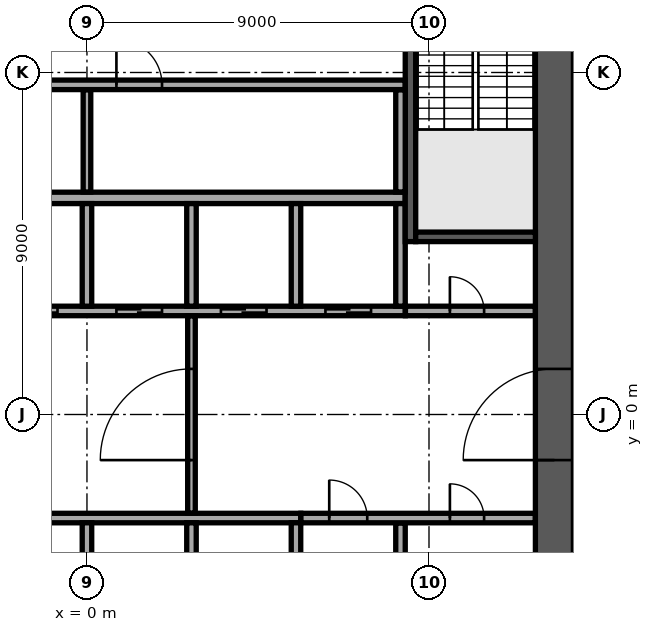
"""IFC4 building model, lengths in metres.
Left out: names, types, materials, properties, quantities, classifications, styles, units other than length and angle.
Written with IfcOpenShell. Run it as: python <this file> out.ifc"""

import sys

from ifc_helpers import new_model, si_unit, direction, frame, frame_2d, origin, place, context, subcontext, project, spatial, rectangle, extrude, element, fill, save


model = new_model("IFC4")
c1 = context("Model", 3, precision=1e-05, world=origin(), true_north=direction((0.0, 1.0)))
c2 = subcontext(c1, "Body", "Model", "MODEL_VIEW")
j1 = project(units=[si_unit("LENGTHUNIT", "METRE"), si_unit("PLANEANGLEUNIT", "RADIAN")], contexts=[c1])
p1 = place(None, origin())
s1 = spatial("IfcSite", under=j1, at=p1, CompositionType="ELEMENT")
p2 = place(p1, origin())
s2 = spatial("IfcBuilding", under=s1, at=p2, CompositionType="ELEMENT")
p3 = place(p2, frame((0.0, 0.0, 135.7)))
s3 = spatial("IfcBuildingStorey", under=s2, at=p3, CompositionType="ELEMENT", Elevation=135.7)
p4 = place(p3, frame((12.3, -11.8, 0.0), z_axis=(0.0, 0.0, 1.0), x_axis=(0.0, 1.0, 0.0)))
e1 = element("IfcWall", 1, at=p4, inside=s3, PredefinedType="SHEAR", context=c2, shape_type="SweptSolid", body=[
    extrude(rectangle(XDim=23.6, YDim=1.0, at=frame_2d((11.8, 0.0))), origin(), (0.0, 0.0, 1.0), 3.6),
])
p5 = place(p4, frame((10.6, 0.0, 0.0)))
e2 = element("IfcOpeningElement", 2, at=p5, cuts=e1, PredefinedType="OPENING", context=c2, shape_type="SweptSolid", body=[
    extrude(rectangle(XDim=2.4, YDim=2.4, at=frame_2d((1.2, 1.2))), frame((0.0, 0.51, 0.0), z_axis=(0.0, -1.0, 0.0), x_axis=(1.0, 0.0, 0.0)), (0.0, 0.0, 1.0), 1.02),
])
p6 = place(p3, frame((-8.375, 5.7, 0.0), z_axis=(0.0, 0.0, 1.0), x_axis=(1.0, 0.0, 0.0)))
e3 = element("IfcWall", 3, at=p6, inside=s3, PredefinedType="SOLIDWALL", context=c2, shape_type="SweptSolid", body=[
    extrude(rectangle(XDim=16.75, YDim=0.3, at=frame_2d((8.375, 0.0))), origin(), (0.0, 0.0, 1.0), 3.6),
])
p7 = place(p3, frame((-8.375, 2.725, 0.0), z_axis=(0.0, 0.0, 1.0), x_axis=(1.0, 0.0, 0.0)))
e4 = element("IfcWall", 4, at=p7, inside=s3, PredefinedType="SOLIDWALL", context=c2, shape_type="SweptSolid", body=[
    extrude(rectangle(XDim=16.75, YDim=0.25, at=frame_2d((8.375, 0.0))), origin(), (0.0, 0.0, 1.0), 3.6),
])
p8 = place(p7, frame((0.9, 0.0, 0.0)))
e5 = element("IfcOpeningElement", 5, at=p8, cuts=e4, PredefinedType="OPENING", context=c2, shape_type="SweptSolid", body=[
    extrude(rectangle(XDim=1.2, YDim=2.1, at=frame_2d((0.6, 1.05))), frame((0.0, 0.135, 0.0), z_axis=(0.0, -1.0, 0.0), x_axis=(1.0, 0.0, 0.0)), (0.0, 0.0, 1.0), 0.27),
])
p9 = place(p7, frame((3.65, 0.0, 0.0)))
e6 = element("IfcOpeningElement", 6, at=p9, cuts=e4, PredefinedType="OPENING", context=c2, shape_type="SweptSolid", body=[
    extrude(rectangle(XDim=1.2, YDim=2.1, at=frame_2d((0.6, 1.05))), frame((0.0, 0.135, 0.0), z_axis=(0.0, -1.0, 0.0), x_axis=(1.0, 0.0, 0.0)), (0.0, 0.0, 1.0), 0.27),
])
p10 = place(p7, frame((6.4, 0.0, 0.0)))
e7 = element("IfcOpeningElement", 7, at=p10, cuts=e4, PredefinedType="OPENING", context=c2, shape_type="SweptSolid", body=[
    extrude(rectangle(XDim=1.2, YDim=2.1, at=frame_2d((0.6, 1.05))), frame((0.0, 0.135, 0.0), z_axis=(0.0, -1.0, 0.0), x_axis=(1.0, 0.0, 0.0)), (0.0, 0.0, 1.0), 0.27),
])
p11 = place(p7, frame((9.15, 0.0, 0.0)))
e8 = element("IfcOpeningElement", 8, at=p11, cuts=e4, PredefinedType="OPENING", context=c2, shape_type="SweptSolid", body=[
    extrude(rectangle(XDim=1.2, YDim=2.1, at=frame_2d((0.6, 1.05))), frame((0.0, 0.135, 0.0), z_axis=(0.0, -1.0, 0.0), x_axis=(1.0, 0.0, 0.0)), (0.0, 0.0, 1.0), 0.27),
])
p12 = place(p7, frame((11.9, 0.0, 0.0)))
e9 = element("IfcOpeningElement", 9, at=p12, cuts=e4, PredefinedType="OPENING", context=c2, shape_type="SweptSolid", body=[
    extrude(rectangle(XDim=1.2, YDim=2.1, at=frame_2d((0.6, 1.05))), frame((0.0, 0.135, 0.0), z_axis=(0.0, -1.0, 0.0), x_axis=(1.0, 0.0, 0.0)), (0.0, 0.0, 1.0), 0.27),
])
p13 = place(p7, frame((14.65, 0.0, 0.0)))
e10 = element("IfcOpeningElement", 10, at=p13, cuts=e4, PredefinedType="OPENING", context=c2, shape_type="SweptSolid", body=[
    extrude(rectangle(XDim=1.2, YDim=2.1, at=frame_2d((0.6, 1.05))), frame((0.0, 0.135, 0.0), z_axis=(0.0, -1.0, 0.0), x_axis=(1.0, 0.0, 0.0)), (0.0, 0.0, 1.0), 0.27),
])
for number, where, z_axis, x_axis in (
    (11, (0.0, 2.85, 0.0), (0.0, 0.0, 1.0), (0.0, 1.0, 0.0)),
    (12, (2.75, 2.85, 0.0), (0.0, 0.0, 1.0), (0.0, 1.0, 0.0)),
    (13, (5.5, 2.85, 0.0), (0.0, 0.0, 1.0), (0.0, 1.0, 0.0)),
    (14, (8.25, 2.85, 0.0), (0.0, 0.0, 1.0), (0.0, 1.0, 0.0)),
):
    element("IfcWall", number, at=place(p3, frame(where, z_axis=z_axis, x_axis=x_axis)), inside=s3, PredefinedType="SOLIDWALL", context=c2, shape_type="SweptSolid", body=[
        extrude(rectangle(XDim=2.7, YDim=0.25, at=frame_2d((1.35, 0.0))), origin(), (0.0, 0.0, 1.0), 3.6),
    ])
p14 = place(p3, frame((-2.875, -2.725, 0.0), z_axis=(0.0, 0.0, 1.0), x_axis=(1.0, 0.0, 0.0)))
e15 = element("IfcWall", 15, at=p14, inside=s3, PredefinedType="SOLIDWALL", context=c2, shape_type="SweptSolid", body=[
    extrude(rectangle(XDim=8.5, YDim=0.25, at=frame_2d((4.25, 0.0))), origin(), (0.0, 0.0, 1.0), 3.6),
])
for number, where, z_axis, x_axis in (
    (16, (0.0, -5.55, 0.0), (0.0, 0.0, 1.0), (0.0, 1.0, 0.0)),
    (17, (2.75, -5.55, 0.0), (0.0, 0.0, 1.0), (0.0, 1.0, 0.0)),
    (18, (5.5, -5.55, 0.0), (0.0, 0.0, 1.0), (0.0, 1.0, 0.0)),
):
    element("IfcWall", number, at=place(p3, frame(where, z_axis=z_axis, x_axis=x_axis)), inside=s3, PredefinedType="SOLIDWALL", context=c2, shape_type="SweptSolid", body=[
        extrude(rectangle(XDim=2.7, YDim=0.25, at=frame_2d((1.35, 0.0))), origin(), (0.0, 0.0, 1.0), 3.6),
    ])
p15 = place(p3, frame((8.512, 4.55, 0.0), z_axis=(0.0, 0.0, 1.0), x_axis=(0.0, 1.0, 0.0)))
e19 = element("IfcWall", 19, at=p15, inside=s3, PredefinedType="SOLIDWALL", context=c2, shape_type="SweptSolid", body=[
    extrude(rectangle(XDim=7.25, YDim=0.275, at=frame_2d((3.625, 0.0))), origin(), (0.0, 0.0, 1.0), 3.6),
])
p16 = place(p15, frame((6.0, 0.0, 0.0)))
e20 = element("IfcOpeningElement", 20, at=p16, cuts=e19, PredefinedType="OPENING", context=c2, shape_type="SweptSolid", body=[
    extrude(rectangle(XDim=1.0, YDim=2.1, at=frame_2d((0.5, 1.05))), frame((0.0, 0.147, 0.0), z_axis=(0.0, -1.0, 0.0), x_axis=(1.0, 0.0, 0.0)), (0.0, 0.0, 1.0), 0.295),
])
p17 = place(p3, frame((8.65, 4.675, 0.0), z_axis=(0.0, 0.0, 1.0), x_axis=(1.0, 0.0, 0.0)))
e21 = element("IfcWall", 21, at=p17, inside=s3, PredefinedType="SOLIDWALL", context=c2, shape_type="SweptSolid", body=[
    extrude(rectangle(XDim=3.15, YDim=0.25, at=frame_2d((1.575, 0.0))), origin(), (0.0, 0.0, 1.0), 3.6),
])
p18 = place(p3, frame((8.25, -5.545, 0.0), z_axis=(0.0, 0.0, 1.0), x_axis=(0.0, 1.0, 0.0)))
e22 = element("IfcWall", 22, at=p18, inside=s3, PredefinedType="PARTITIONING", context=c2, shape_type="SweptSolid", body=[
    extrude(rectangle(XDim=2.69, YDim=0.25, at=frame_2d((1.345, 0.0))), origin(), (0.0, 0.0, 1.0), 3.6),
])
p19 = place(p3, frame((5.63, -2.725, 0.0), z_axis=(0.0, 0.0, 1.0), x_axis=(1.0, 0.0, 0.0)))
e23 = element("IfcWall", 23, at=p19, inside=s3, PredefinedType="PARTITIONING", context=c2, shape_type="SweptSolid", body=[
    extrude(rectangle(XDim=6.165, YDim=0.25, at=frame_2d((3.083, 0.0))), origin(), (0.0, 0.0, 1.0), 3.6),
])
p20 = place(p19, frame((0.745, 0.0, 0.0)))
e24 = element("IfcOpeningElement", 24, at=p20, cuts=e23, PredefinedType="OPENING", context=c2, shape_type="SweptSolid", body=[
    extrude(rectangle(XDim=1.0, YDim=2.1, at=frame_2d((0.5, 1.05))), frame((0.0, 0.135, 0.0), z_axis=(0.0, -1.0, 0.0), x_axis=(1.0, 0.0, 0.0)), (0.0, 0.0, 1.0), 0.27),
])
p21 = place(p19, frame((3.92, 0.0, 0.0)))
e25 = element("IfcOpeningElement", 25, at=p21, cuts=e23, PredefinedType="OPENING", context=c2, shape_type="SweptSolid", body=[
    extrude(rectangle(XDim=0.9, YDim=2.1, at=frame_2d((0.45, 1.05))), frame((0.0, 0.135, 0.0), z_axis=(0.0, -1.0, 0.0), x_axis=(1.0, 0.0, 0.0)), (0.0, 0.0, 1.0), 0.27),
])
p22 = place(p3, frame((2.75, -2.595, 0.0), z_axis=(0.0, 0.0, 1.0), x_axis=(0.0, 1.0, 0.0)))
e26 = element("IfcWall", 26, at=p22, inside=s3, PredefinedType="PARTITIONING", context=c2, shape_type="SweptSolid", body=[
    extrude(rectangle(XDim=5.19, YDim=0.2, at=frame_2d((2.595, 0.0))), origin(), (0.0, 0.0, 1.0), 3.6),
])
p23 = place(p22, frame((1.395, 0.0, 0.0)))
e27 = element("IfcOpeningElement", 27, at=p23, cuts=e26, PredefinedType="OPENING", context=c2, shape_type="SweptSolid", body=[
    extrude(rectangle(XDim=2.4, YDim=2.4, at=frame_2d((1.2, 1.2))), frame((0.0, 0.11, 0.0), z_axis=(0.0, -1.0, 0.0), x_axis=(1.0, 0.0, 0.0)), (0.0, 0.0, 1.0), 0.22),
])
p24 = place(p3, frame((8.38, 2.725, 0.0), z_axis=(0.0, 0.0, 1.0), x_axis=(1.0, 0.0, 0.0)))
e28 = element("IfcWall", 28, at=p24, inside=s3, PredefinedType="PARTITIONING", context=c2, shape_type="SweptSolid", body=[
    extrude(rectangle(XDim=3.415, YDim=0.25, at=frame_2d((1.708, 0.0))), origin(), (0.0, 0.0, 1.0), 3.6),
])
p25 = place(p24, frame((1.17, 0.0, 0.0)))
e29 = element("IfcOpeningElement", 29, at=p25, cuts=e28, PredefinedType="OPENING", context=c2, shape_type="SweptSolid", body=[
    extrude(rectangle(XDim=0.9, YDim=2.1, at=frame_2d((0.45, 1.05))), frame((0.0, 0.135, 0.0), z_axis=(0.0, -1.0, 0.0), x_axis=(1.0, 0.0, 0.0)), (0.0, 0.0, 1.0), 0.27),
])
p26 = place(p3, frame((0.0, 5.855, 0.0), z_axis=(0.0, 0.0, 1.0), x_axis=(0.0, 1.0, 0.0)))
e30 = element("IfcWall", 30, at=p26, inside=s3, PredefinedType="PARTITIONING", context=c2, shape_type="SweptSolid", body=[
    extrude(rectangle(XDim=2.69, YDim=0.2, at=frame_2d((1.345, 0.0))), origin(), (0.0, 0.0, 1.0), 3.6),
])
p27 = place(p3, frame((8.25, 5.855, 0.0), z_axis=(0.0, 0.0, 1.0), x_axis=(0.0, 1.0, 0.0)))
e31 = element("IfcWall", 31, at=p27, inside=s3, PredefinedType="PARTITIONING", context=c2, shape_type="SweptSolid", body=[
    extrude(rectangle(XDim=2.69, YDim=0.25, at=frame_2d((1.345, 0.0))), origin(), (0.0, 0.0, 1.0), 3.6),
])
p28 = place(p3, frame((-8.35, 8.675, 0.0), z_axis=(0.0, 0.0, 1.0), x_axis=(1.0, 0.0, 0.0)))
e32 = element("IfcWall", 32, at=p28, inside=s3, PredefinedType="PARTITIONING", context=c2, shape_type="SweptSolid", body=[
    extrude(rectangle(XDim=16.72, YDim=0.25, at=frame_2d((8.36, 0.0))), origin(), (0.0, 0.0, 1.0), 3.6),
])
p29 = place(p28, frame((0.975, 0.0, 0.0)))
e33 = element("IfcOpeningElement", 33, at=p29, cuts=e32, PredefinedType="OPENING", context=c2, shape_type="SweptSolid", body=[
    extrude(rectangle(XDim=1.0, YDim=2.1, at=frame_2d((0.5, 1.05))), frame((0.0, 0.135, 0.0), z_axis=(0.0, -1.0, 0.0), x_axis=(1.0, 0.0, 0.0)), (0.0, 0.0, 1.0), 0.27),
])
p30 = place(p28, frame((3.725, 0.0, 0.0)))
e34 = element("IfcOpeningElement", 34, at=p30, cuts=e32, PredefinedType="OPENING", context=c2, shape_type="SweptSolid", body=[
    extrude(rectangle(XDim=1.0, YDim=2.1, at=frame_2d((0.5, 1.05))), frame((0.0, 0.135, 0.0), z_axis=(0.0, -1.0, 0.0), x_axis=(1.0, 0.0, 0.0)), (0.0, 0.0, 1.0), 0.27),
])
p31 = place(p28, frame((9.125, 0.0, 0.0)))
e35 = element("IfcOpeningElement", 35, at=p31, cuts=e32, PredefinedType="OPENING", context=c2, shape_type="SweptSolid", body=[
    extrude(rectangle(XDim=1.2, YDim=2.1, at=frame_2d((0.6, 1.05))), frame((0.0, 0.135, 0.0), z_axis=(0.0, -1.0, 0.0), x_axis=(1.0, 0.0, 0.0)), (0.0, 0.0, 1.0), 0.27),
])
p32 = place(p3, frame((-23.187, 9.123, 0.0), z_axis=(0.0, 0.0, 1.0), x_axis=(0.874618419846, 0.484811942578, 0.0)))
e36 = element("IfcWall", 36, at=p32, inside=s3, PredefinedType="PARTITIONING", context=c2, shape_type="SweptSolid", body=[
    extrude(rectangle(XDim=31.713, YDim=0.15, at=frame_2d((15.857, 0.0))), origin(), (0.0, 0.0, 1.0), 3.15),
])
p33 = place(p32, frame((11.252, 0.0, 0.0)))
e37 = element("IfcOpeningElement", 37, at=p33, cuts=e36, PredefinedType="OPENING", context=c2, shape_type="SweptSolid", body=[
    extrude(rectangle(XDim=1.0, YDim=2.1, at=frame_2d((0.5, 1.05))), frame((0.0, 0.085, 0.0), z_axis=(0.0, -1.0, 0.0), x_axis=(1.0, 0.0, 0.0)), (0.0, 0.0, 1.0), 0.17),
])
p34 = place(p32, frame((19.896, 0.0, 0.0)))
e38 = element("IfcOpeningElement", 38, at=p34, cuts=e36, PredefinedType="OPENING", context=c2, shape_type="SweptSolid", body=[
    extrude(rectangle(XDim=1.0, YDim=2.1, at=frame_2d((0.5, 1.05))), frame((0.0, 0.085, 0.0), z_axis=(0.0, -1.0, 0.0), x_axis=(1.0, 0.0, 0.0)), (0.0, 0.0, 1.0), 0.17),
])
p35 = place(p32, frame((29.223, 0.0, 0.0)))
e39 = element("IfcOpeningElement", 39, at=p35, cuts=e36, PredefinedType="OPENING", context=c2, shape_type="SweptSolid", body=[
    extrude(rectangle(XDim=1.0, YDim=2.1, at=frame_2d((0.5, 1.05))), frame((0.0, 0.085, 0.0), z_axis=(0.0, -1.0, 0.0), x_axis=(1.0, 0.0, 0.0)), (0.0, 0.0, 1.0), 0.17),
])
p36 = place(p5, origin())
e40 = element("IfcDoor", 40, at=p36, inside=s3, OperationType="SINGLE_SWING_LEFT", PredefinedType="DOOR", context=c2, shape_type="SweptSolid", body=[
    extrude(rectangle(XDim=2.4, YDim=2.4, at=frame_2d((1.2, 1.2))), frame((0.0, 0.025, 0.0), z_axis=(0.0, -1.0, 0.0), x_axis=(1.0, 0.0, 0.0)), (0.0, 0.0, 1.0), 0.05),
])
fill(e2, e40)
p37 = place(p10, origin())
e41 = element("IfcDoor", 41, at=p37, inside=s3, OperationType="DOUBLE_DOOR_SLIDING", PredefinedType="DOOR", context=c2, shape_type="SweptSolid", body=[
    extrude(rectangle(XDim=1.2, YDim=2.1, at=frame_2d((0.6, 1.05))), frame((0.0, 0.025, 0.0), z_axis=(0.0, -1.0, 0.0), x_axis=(1.0, 0.0, 0.0)), (0.0, 0.0, 1.0), 0.05),
])
fill(e7, e41)
p38 = place(p11, origin())
e42 = element("IfcDoor", 42, at=p38, inside=s3, OperationType="DOUBLE_DOOR_SLIDING", PredefinedType="DOOR", context=c2, shape_type="SweptSolid", body=[
    extrude(rectangle(XDim=1.2, YDim=2.1, at=frame_2d((0.6, 1.05))), frame((0.0, 0.025, 0.0), z_axis=(0.0, -1.0, 0.0), x_axis=(1.0, 0.0, 0.0)), (0.0, 0.0, 1.0), 0.05),
])
fill(e8, e42)
p39 = place(p12, origin())
e43 = element("IfcDoor", 43, at=p39, inside=s3, OperationType="DOUBLE_DOOR_SLIDING", PredefinedType="DOOR", context=c2, shape_type="SweptSolid", body=[
    extrude(rectangle(XDim=1.2, YDim=2.1, at=frame_2d((0.6, 1.05))), frame((0.0, 0.025, 0.0), z_axis=(0.0, -1.0, 0.0), x_axis=(1.0, 0.0, 0.0)), (0.0, 0.0, 1.0), 0.05),
])
fill(e9, e43)
p40 = place(p13, origin())
e44 = element("IfcDoor", 44, at=p40, inside=s3, OperationType="DOUBLE_DOOR_SLIDING", PredefinedType="DOOR", context=c2, shape_type="SweptSolid", body=[
    extrude(rectangle(XDim=1.2, YDim=2.1, at=frame_2d((0.6, 1.05))), frame((0.0, 0.025, 0.0), z_axis=(0.0, -1.0, 0.0), x_axis=(1.0, 0.0, 0.0)), (0.0, 0.0, 1.0), 0.05),
])
fill(e10, e44)
p41 = place(p20, origin())
e45 = element("IfcDoor", 45, at=p41, inside=s3, OperationType="SINGLE_SWING_RIGHT", PredefinedType="DOOR", context=c2, shape_type="SweptSolid", body=[
    extrude(rectangle(XDim=1.0, YDim=2.1, at=frame_2d((0.5, 1.05))), frame((0.0, 0.025, 0.0), z_axis=(0.0, -1.0, 0.0), x_axis=(1.0, 0.0, 0.0)), (0.0, 0.0, 1.0), 0.05),
])
fill(e24, e45)
p42 = place(p25, origin())
e46 = element("IfcDoor", 46, at=p42, inside=s3, OperationType="SINGLE_SWING_RIGHT", PredefinedType="DOOR", context=c2, shape_type="SweptSolid", body=[
    extrude(rectangle(XDim=0.9, YDim=2.1, at=frame_2d((0.45, 1.05))), frame((0.0, 0.025, 0.0), z_axis=(0.0, -1.0, 0.0), x_axis=(1.0, 0.0, 0.0)), (0.0, 0.0, 1.0), 0.05),
])
fill(e29, e46)
p43 = place(p21, origin())
e47 = element("IfcDoor", 47, at=p43, inside=s3, OperationType="SINGLE_SWING_RIGHT", PredefinedType="DOOR", context=c2, shape_type="SweptSolid", body=[
    extrude(rectangle(XDim=0.9, YDim=2.1, at=frame_2d((0.45, 1.05))), frame((0.0, 0.025, 0.0), z_axis=(0.0, -1.0, 0.0), x_axis=(1.0, 0.0, 0.0)), (0.0, 0.0, 1.0), 0.05),
])
fill(e25, e47)
p44 = place(p31, origin())
e48 = element("IfcDoor", 48, at=p44, inside=s3, OperationType="SINGLE_SWING_LEFT", PredefinedType="DOOR", context=c2, shape_type="SweptSolid", body=[
    extrude(rectangle(XDim=1.2, YDim=2.1, at=frame_2d((0.6, 1.05))), frame((0.0, 0.025, 0.0), z_axis=(0.0, -1.0, 0.0), x_axis=(1.0, 0.0, 0.0)), (0.0, 0.0, 1.0), 0.05),
])
fill(e35, e48)
p45 = place(p23, origin())
e49 = element("IfcDoor", 49, at=p45, inside=s3, OperationType="DOUBLE_DOOR_DOUBLE_SWING", PredefinedType="DOOR", context=c2, shape_type="SweptSolid", body=[
    extrude(rectangle(XDim=2.4, YDim=2.4, at=frame_2d((1.2, 1.2))), frame((0.0, 0.025, 0.0), z_axis=(0.0, -1.0, 0.0), x_axis=(1.0, 0.0, 0.0)), (0.0, 0.0, 1.0), 0.05),
])
fill(e27, e49)
save(model, sys.argv[1])
